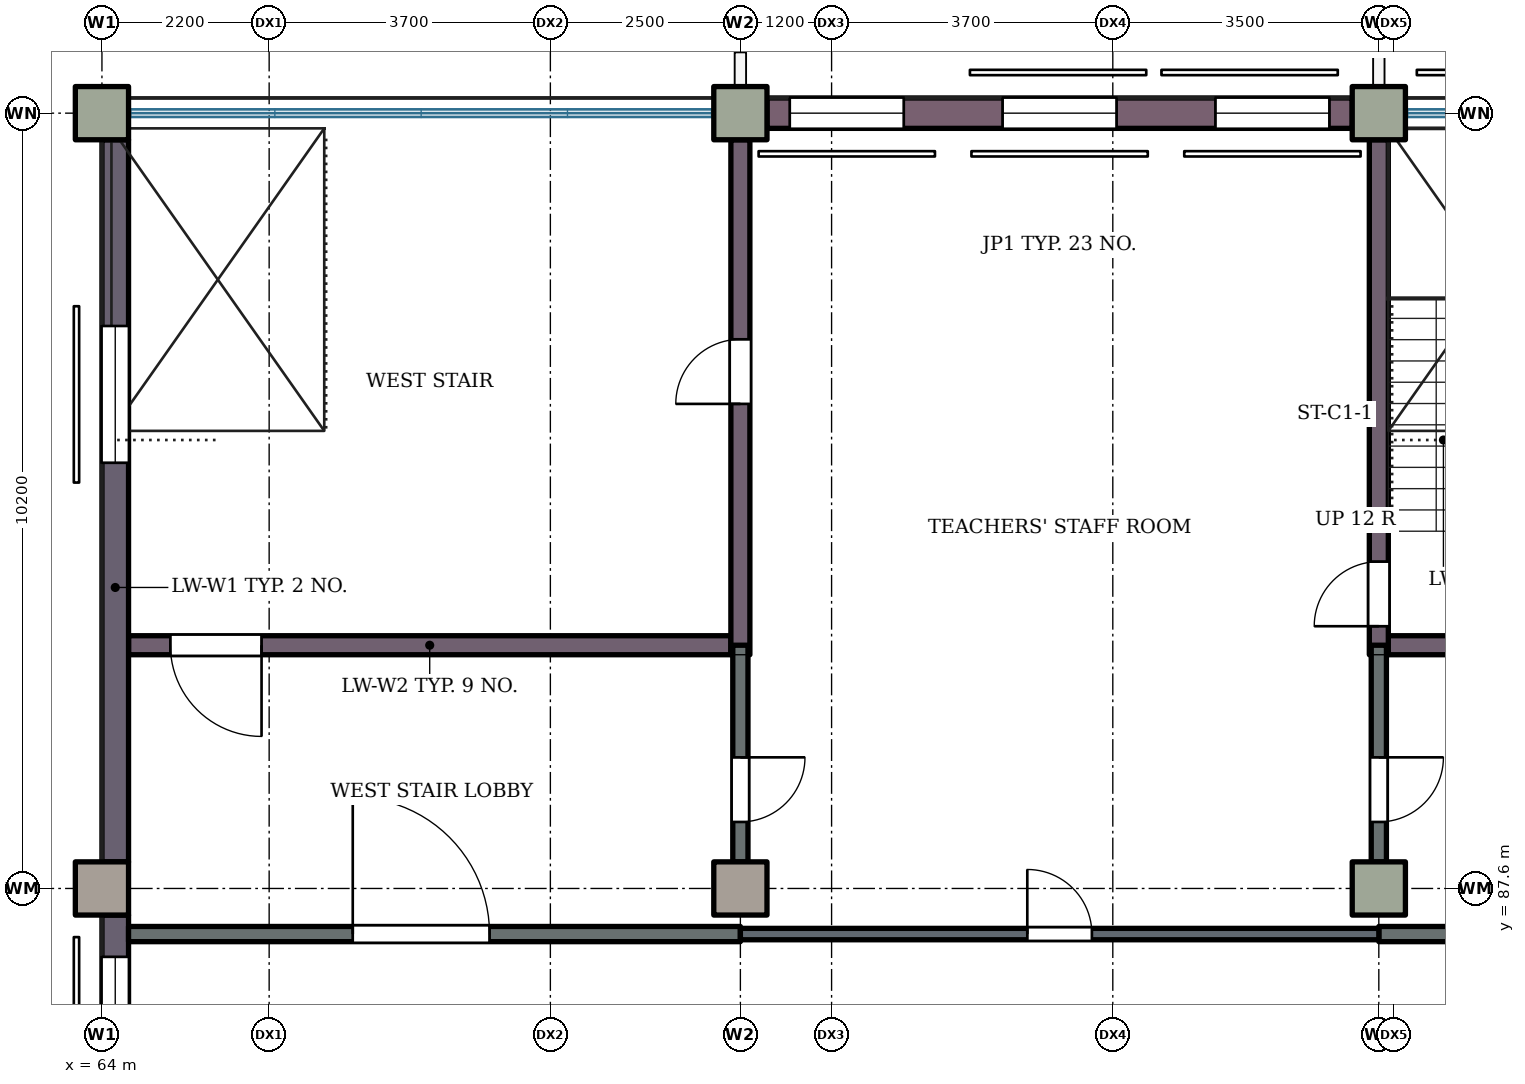
"""IFC4 building model, lengths in metres.
Left out: names, types, materials, properties, quantities, classifications, styles, units other than length and angle.
Written with IfcOpenShell. Run it as: python <this file> out.ifc"""

import sys

from ifc_helpers import new_model, si_unit, direction, frame, frame_2d, origin, origin_2d, place, context, subcontext, project, spatial, rectangle, extrude, element, fill, save


model = new_model("IFC4")
c1 = context("Model", 3, precision=1e-05, world=origin(), true_north=direction((0.0, 1.0)))
c2 = subcontext(c1, "Body", "Model", "MODEL_VIEW")
j1 = project(units=[si_unit("LENGTHUNIT", "METRE"), si_unit("PLANEANGLEUNIT", "RADIAN")], contexts=[c1])
p1 = place(None, origin())
s1 = spatial("IfcSite", under=j1, at=p1, CompositionType="ELEMENT")
p2 = place(p1, origin())
s2 = spatial("IfcBuilding", under=s1, at=p2, CompositionType="ELEMENT")
p3 = place(p2, frame((0.0, 0.0, 4.2)))
s3 = spatial("IfcBuildingStorey", under=s2, at=p3, CompositionType="ELEMENT", Elevation=4.2)
for number, where, z_axis, x_axis in (
    (1, (64.0, 87.6, 0.0), (0.0, 0.0, 1.0), (1.0, 0.0, 0.0)),
    (2, (72.4, 87.6, 0.0), (0.0, 0.0, 1.0), (1.0, 0.0, 0.0)),
    (3, (80.8, 87.6, 0.0), (0.0, 0.0, 1.0), (1.0, 0.0, 0.0)),
    (4, (64.0, 97.8, 0.0), (0.0, 0.0, 1.0), (1.0, 0.0, 0.0)),
    (5, (72.4, 97.8, 0.0), (0.0, 0.0, 1.0), (1.0, 0.0, 0.0)),
    (6, (80.8, 97.8, 0.0), (0.0, 0.0, 1.0), (1.0, 0.0, 0.0)),
):
    element("IfcColumn", number, at=place(p3, frame(where, z_axis=z_axis, x_axis=x_axis)), inside=s3, PredefinedType="COLUMN", context=c2, shape_type="SweptSolid", body=[
        extrude(rectangle(XDim=0.7, YDim=0.7, at=origin_2d()), origin(), (0.0, 0.0, 1.0), 4.2),
    ])
p4 = place(p3, frame((64.35, 90.8, 0.0), z_axis=(0.0, 0.0, 1.0), x_axis=(1.0, 0.0, 0.0)))
e7 = element("IfcWall", 7, at=p4, inside=s3, PredefinedType="SHEAR", context=c2, shape_type="SweptSolid", body=[
    extrude(rectangle(XDim=7.925, YDim=0.25, at=frame_2d((3.962, 0.0))), origin(), (0.0, 0.0, 1.0), 4.2),
])
p5 = place(p4, frame((0.55, 0.0, 0.0)))
e8 = element("IfcOpeningElement", 8, at=p5, cuts=e7, PredefinedType="OPENING", context=c2, shape_type="SweptSolid", body=[
    extrude(rectangle(XDim=1.2, YDim=2.1, at=frame_2d((0.6, 1.05))), frame((0.0, 0.135, 0.0), z_axis=(0.0, -1.0, 0.0), x_axis=(1.0, 0.0, 0.0)), (0.0, 0.0, 1.0), 0.27),
])
p6 = place(p3, frame((80.925, 90.8, 0.0), z_axis=(0.0, 0.0, 1.0), x_axis=(1.0, 0.0, 0.0)))
e9 = element("IfcWall", 9, at=p6, inside=s3, PredefinedType="SHEAR", context=c2, shape_type="SweptSolid", body=[
    extrude(rectangle(XDim=5.45, YDim=0.25, at=frame_2d((2.725, 0.0))), origin(), (0.0, 0.0, 1.0), 4.2),
])
p7 = place(p6, frame((0.775, 0.0, 0.0)))
e10 = element("IfcOpeningElement", 10, at=p7, cuts=e9, PredefinedType="OPENING", context=c2, shape_type="SweptSolid", body=[
    extrude(rectangle(XDim=1.2, YDim=2.1, at=frame_2d((0.6, 1.05))), frame((0.0, 0.135, 0.0), z_axis=(0.0, -1.0, 0.0), x_axis=(1.0, 0.0, 0.0)), (0.0, 0.0, 1.0), 0.27),
])
p8 = place(p3, frame((64.175, 78.75, 0.0), z_axis=(0.0, 0.0, 1.0), x_axis=(0.0, 1.0, 0.0)))
e11 = element("IfcWall", 11, at=p8, inside=s3, PredefinedType="SHEAR", context=c2, shape_type="SweptSolid", body=[
    extrude(rectangle(XDim=8.5, YDim=0.35, at=frame_2d((4.25, 0.0))), origin(), (0.0, 0.0, 1.0), 4.2),
])
p9 = place(p8, frame((0.55, 0.0, 0.9)))
e12 = element("IfcOpeningElement", 12, at=p9, cuts=e11, PredefinedType="OPENING", context=c2, shape_type="SweptSolid", body=[
    extrude(rectangle(XDim=1.8, YDim=2.1, at=frame_2d((0.9, 1.05))), frame((0.0, 0.185, 0.0), z_axis=(0.0, -1.0, 0.0), x_axis=(1.0, 0.0, 0.0)), (0.0, 0.0, 1.0), 0.37),
])
p10 = place(p8, frame((6.15, 0.0, 0.9)))
e13 = element("IfcOpeningElement", 13, at=p10, cuts=e11, PredefinedType="OPENING", context=c2, shape_type="SweptSolid", body=[
    extrude(rectangle(XDim=1.8, YDim=2.1, at=frame_2d((0.9, 1.05))), frame((0.0, 0.185, 0.0), z_axis=(0.0, -1.0, 0.0), x_axis=(1.0, 0.0, 0.0)), (0.0, 0.0, 1.0), 0.37),
])
p11 = place(p3, frame((64.175, 87.95, 0.0), z_axis=(0.0, 0.0, 1.0), x_axis=(0.0, 1.0, 0.0)))
e14 = element("IfcWall", 14, at=p11, inside=s3, PredefinedType="SHEAR", context=c2, shape_type="SweptSolid", body=[
    extrude(rectangle(XDim=9.5, YDim=0.35, at=frame_2d((4.75, 0.0))), origin(), (0.0, 0.0, 1.0), 4.2),
])
p12 = place(p11, frame((5.25, 0.0, 0.9)))
e15 = element("IfcOpeningElement", 15, at=p12, cuts=e14, PredefinedType="OPENING", context=c2, shape_type="SweptSolid", body=[
    extrude(rectangle(XDim=1.8, YDim=2.1, at=frame_2d((0.9, 1.05))), frame((0.0, 0.185, 0.0), z_axis=(0.0, -1.0, 0.0), x_axis=(1.0, 0.0, 0.0)), (0.0, 0.0, 1.0), 0.37),
])
p13 = place(p3, frame((72.4, 90.675, 0.0), z_axis=(0.0, 0.0, 1.0), x_axis=(0.0, 1.0, 0.0)))
e16 = element("IfcWall", 16, at=p13, inside=s3, PredefinedType="SHEAR", context=c2, shape_type="SweptSolid", body=[
    extrude(rectangle(XDim=6.775, YDim=0.25, at=frame_2d((3.387, 0.0))), origin(), (0.0, 0.0, 1.0), 4.2),
])
p14 = place(p13, frame((3.3, 0.0, 0.0)))
e17 = element("IfcOpeningElement", 17, at=p14, cuts=e16, PredefinedType="OPENING", context=c2, shape_type="SweptSolid", body=[
    extrude(rectangle(XDim=0.85, YDim=2.1, at=frame_2d((0.425, 1.05))), frame((0.0, 0.135, 0.0), z_axis=(0.0, -1.0, 0.0), x_axis=(1.0, 0.0, 0.0)), (0.0, 0.0, 1.0), 0.27),
])
p15 = place(p3, frame((80.8, 90.675, 0.0), z_axis=(0.0, 0.0, 1.0), x_axis=(0.0, 1.0, 0.0)))
e18 = element("IfcWall", 18, at=p15, inside=s3, PredefinedType="SHEAR", context=c2, shape_type="SweptSolid", body=[
    extrude(rectangle(XDim=6.775, YDim=0.25, at=frame_2d((3.387, 0.0))), origin(), (0.0, 0.0, 1.0), 4.2),
])
p16 = place(p15, frame((0.375, 0.0, 0.0)))
e19 = element("IfcOpeningElement", 19, at=p16, cuts=e18, PredefinedType="OPENING", context=c2, shape_type="SweptSolid", body=[
    extrude(rectangle(XDim=0.85, YDim=2.1, at=frame_2d((0.425, 1.05))), frame((0.0, 0.135, 0.0), z_axis=(0.0, -1.0, 0.0), x_axis=(1.0, 0.0, 0.0)), (0.0, 0.0, 1.0), 0.27),
])
p17 = place(p3, frame((72.75, 97.8, 0.0), z_axis=(0.0, 0.0, 1.0), x_axis=(1.0, 0.0, 0.0)))
e20 = element("IfcWall", 20, at=p17, inside=s3, PredefinedType="SOLIDWALL", context=c2, shape_type="SweptSolid", body=[
    extrude(rectangle(XDim=7.7, YDim=0.4, at=frame_2d((3.85, 0.0))), origin(), (0.0, 0.0, 1.0), 3.32),
])
p18 = place(p17, frame((0.3, 0.0, 1.2)))
e21 = element("IfcOpeningElement", 21, at=p18, cuts=e20, PredefinedType="OPENING", context=c2, shape_type="SweptSolid", body=[
    extrude(rectangle(XDim=1.5, YDim=1.8, at=frame_2d((0.75, 0.9))), frame((0.0, 0.21, 0.0), z_axis=(0.0, -1.0, 0.0), x_axis=(1.0, 0.0, 0.0)), (0.0, 0.0, 1.0), 0.42),
])
p19 = place(p17, frame((3.1, 0.0, 1.2)))
e22 = element("IfcOpeningElement", 22, at=p19, cuts=e20, PredefinedType="OPENING", context=c2, shape_type="SweptSolid", body=[
    extrude(rectangle(XDim=1.5, YDim=1.8, at=frame_2d((0.75, 0.9))), frame((0.0, 0.21, 0.0), z_axis=(0.0, -1.0, 0.0), x_axis=(1.0, 0.0, 0.0)), (0.0, 0.0, 1.0), 0.42),
])
p20 = place(p17, frame((5.9, 0.0, 1.2)))
e23 = element("IfcOpeningElement", 23, at=p20, cuts=e20, PredefinedType="OPENING", context=c2, shape_type="SweptSolid", body=[
    extrude(rectangle(XDim=1.5, YDim=1.8, at=frame_2d((0.75, 0.9))), frame((0.0, 0.21, 0.0), z_axis=(0.0, -1.0, 0.0), x_axis=(1.0, 0.0, 0.0)), (0.0, 0.0, 1.0), 0.42),
])
p21 = place(p3, frame((64.35, 87.0, 0.0), z_axis=(0.0, 0.0, 1.0), x_axis=(1.0, 0.0, 0.0)))
e24 = element("IfcWall", 24, at=p21, inside=s3, PredefinedType="PARTITIONING", context=c2, shape_type="SweptSolid", body=[
    extrude(rectangle(XDim=8.05, YDim=0.2, at=frame_2d((4.025, 0.0))), origin(), (0.0, 0.0, 1.0), 3.92),
])
p22 = place(p21, frame((2.95, 0.0, 0.0)))
e25 = element("IfcOpeningElement", 25, at=p22, cuts=e24, PredefinedType="OPENING", context=c2, shape_type="SweptSolid", body=[
    extrude(rectangle(XDim=1.8, YDim=2.1, at=frame_2d((0.9, 1.05))), frame((0.0, 0.11, 0.0), z_axis=(0.0, -1.0, 0.0), x_axis=(1.0, 0.0, 0.0)), (0.0, 0.0, 1.0), 0.22),
])
p23 = place(p3, frame((80.8, 87.0, 0.0), z_axis=(0.0, 0.0, 1.0), x_axis=(1.0, 0.0, 0.0)))
e26 = element("IfcWall", 26, at=p23, inside=s3, PredefinedType="PARTITIONING", context=c2, shape_type="SweptSolid", body=[
    extrude(rectangle(XDim=8.4, YDim=0.2, at=frame_2d((4.2, 0.0))), origin(), (0.0, 0.0, 1.0), 3.92),
])
p24 = place(p23, frame((3.3, 0.0, 0.0)))
e27 = element("IfcOpeningElement", 27, at=p24, cuts=e26, PredefinedType="OPENING", context=c2, shape_type="SweptSolid", body=[
    extrude(rectangle(XDim=1.8, YDim=2.1, at=frame_2d((0.9, 1.05))), frame((0.0, 0.11, 0.0), z_axis=(0.0, -1.0, 0.0), x_axis=(1.0, 0.0, 0.0)), (0.0, 0.0, 1.0), 0.22),
])
p25 = place(p3, frame((72.4, 87.0, 0.0), z_axis=(0.0, 0.0, 1.0), x_axis=(1.0, 0.0, 0.0)))
e28 = element("IfcWall", 28, at=p25, inside=s3, PredefinedType="PARTITIONING", context=c2, shape_type="SweptSolid", body=[
    extrude(rectangle(XDim=8.4, YDim=0.15, at=frame_2d((4.2, 0.0))), origin(), (0.0, 0.0, 1.0), 3.92),
])
p26 = place(p25, frame((3.775, 0.0, 0.0)))
e29 = element("IfcOpeningElement", 29, at=p26, cuts=e28, PredefinedType="OPENING", context=c2, shape_type="SweptSolid", body=[
    extrude(rectangle(XDim=0.85, YDim=2.1, at=frame_2d((0.425, 1.05))), frame((0.0, 0.085, 0.0), z_axis=(0.0, -1.0, 0.0), x_axis=(1.0, 0.0, 0.0)), (0.0, 0.0, 1.0), 0.17),
])
p27 = place(p3, frame((72.4, 87.95, 0.0), z_axis=(0.0, 0.0, 1.0), x_axis=(0.0, 1.0, 0.0)))
e30 = element("IfcWall", 30, at=p27, inside=s3, PredefinedType="PARTITIONING", context=c2, shape_type="SweptSolid", body=[
    extrude(rectangle(XDim=2.85, YDim=0.2, at=frame_2d((1.425, 0.0))), origin(), (0.0, 0.0, 1.0), 3.02),
])
p28 = place(p27, frame((0.525, 0.0, 0.0)))
e31 = element("IfcOpeningElement", 31, at=p28, cuts=e30, PredefinedType="OPENING", context=c2, shape_type="SweptSolid", body=[
    extrude(rectangle(XDim=0.85, YDim=2.1, at=frame_2d((0.425, 1.05))), frame((0.0, 0.11, 0.0), z_axis=(0.0, -1.0, 0.0), x_axis=(1.0, 0.0, 0.0)), (0.0, 0.0, 1.0), 0.22),
])
p29 = place(p3, frame((80.8, 87.95, 0.0), z_axis=(0.0, 0.0, 1.0), x_axis=(0.0, 1.0, 0.0)))
e32 = element("IfcWall", 32, at=p29, inside=s3, PredefinedType="PARTITIONING", context=c2, shape_type="SweptSolid", body=[
    extrude(rectangle(XDim=2.85, YDim=0.2, at=frame_2d((1.425, 0.0))), origin(), (0.0, 0.0, 1.0), 3.02),
])
p30 = place(p29, frame((0.525, 0.0, 0.0)))
e33 = element("IfcOpeningElement", 33, at=p30, cuts=e32, PredefinedType="OPENING", context=c2, shape_type="SweptSolid", body=[
    extrude(rectangle(XDim=0.85, YDim=2.1, at=frame_2d((0.425, 1.05))), frame((0.0, 0.11, 0.0), z_axis=(0.0, -1.0, 0.0), x_axis=(1.0, 0.0, 0.0)), (0.0, 0.0, 1.0), 0.22),
])
p31 = place(p18, origin())
e34 = element("IfcWindow", 34, at=p31, inside=s3, PartitioningType="SINGLE_PANEL", PredefinedType="WINDOW", context=c2, shape_type="SweptSolid", body=[
    extrude(rectangle(XDim=1.5, YDim=1.8, at=frame_2d((0.75, 0.9))), frame((0.0, 0.03, 0.0), z_axis=(0.0, -1.0, 0.0), x_axis=(1.0, 0.0, 0.0)), (0.0, 0.0, 1.0), 0.06),
])
fill(e21, e34)
p32 = place(p19, origin())
e35 = element("IfcWindow", 35, at=p32, inside=s3, PartitioningType="SINGLE_PANEL", PredefinedType="WINDOW", context=c2, shape_type="SweptSolid", body=[
    extrude(rectangle(XDim=1.5, YDim=1.8, at=frame_2d((0.75, 0.9))), frame((0.0, 0.03, 0.0), z_axis=(0.0, -1.0, 0.0), x_axis=(1.0, 0.0, 0.0)), (0.0, 0.0, 1.0), 0.06),
])
fill(e22, e35)
p33 = place(p20, origin())
e36 = element("IfcWindow", 36, at=p33, inside=s3, PartitioningType="SINGLE_PANEL", PredefinedType="WINDOW", context=c2, shape_type="SweptSolid", body=[
    extrude(rectangle(XDim=1.5, YDim=1.8, at=frame_2d((0.75, 0.9))), frame((0.0, 0.03, 0.0), z_axis=(0.0, -1.0, 0.0), x_axis=(1.0, 0.0, 0.0)), (0.0, 0.0, 1.0), 0.06),
])
fill(e23, e36)
p34 = place(p10, origin())
e37 = element("IfcWindow", 37, at=p34, inside=s3, PartitioningType="SINGLE_PANEL", PredefinedType="WINDOW", context=c2, shape_type="SweptSolid", body=[
    extrude(rectangle(XDim=1.8, YDim=2.1, at=frame_2d((0.9, 1.05))), frame((0.0, 0.03, 0.0), z_axis=(0.0, -1.0, 0.0), x_axis=(1.0, 0.0, 0.0)), (0.0, 0.0, 1.0), 0.06),
])
fill(e13, e37)
p35 = place(p12, origin())
e38 = element("IfcWindow", 38, at=p35, inside=s3, PartitioningType="SINGLE_PANEL", PredefinedType="WINDOW", context=c2, shape_type="SweptSolid", body=[
    extrude(rectangle(XDim=1.8, YDim=2.1, at=frame_2d((0.9, 1.05))), frame((0.0, 0.03, 0.0), z_axis=(0.0, -1.0, 0.0), x_axis=(1.0, 0.0, 0.0)), (0.0, 0.0, 1.0), 0.06),
])
fill(e15, e38)
p36 = place(p26, origin())
e39 = element("IfcDoor", 39, at=p36, inside=s3, OperationType="SINGLE_SWING_LEFT", PredefinedType="DOOR", context=c2, shape_type="SweptSolid", body=[
    extrude(rectangle(XDim=0.85, YDim=2.1, at=frame_2d((0.425, 1.05))), frame((0.0, 0.025, 0.0), z_axis=(0.0, -1.0, 0.0), x_axis=(1.0, 0.0, 0.0)), (0.0, 0.0, 1.0), 0.05),
])
fill(e29, e39)
p37 = place(p28, origin())
e40 = element("IfcDoor", 40, at=p37, inside=s3, OperationType="SINGLE_SWING_RIGHT", PredefinedType="DOOR", context=c2, shape_type="SweptSolid", body=[
    extrude(rectangle(XDim=0.85, YDim=2.1, at=frame_2d((0.425, 1.05))), frame((0.0, 0.025, 0.0), z_axis=(0.0, -1.0, 0.0), x_axis=(1.0, 0.0, 0.0)), (0.0, 0.0, 1.0), 0.05),
])
fill(e31, e40)
p38 = place(p14, origin())
e41 = element("IfcDoor", 41, at=p38, inside=s3, OperationType="SINGLE_SWING_LEFT", PredefinedType="DOOR", context=c2, shape_type="SweptSolid", body=[
    extrude(rectangle(XDim=0.85, YDim=2.1, at=frame_2d((0.425, 1.05))), frame((0.0, 0.025, 0.0), z_axis=(0.0, -1.0, 0.0), x_axis=(1.0, 0.0, 0.0)), (0.0, 0.0, 1.0), 0.05),
])
fill(e17, e41)
p39 = place(p30, origin())
e42 = element("IfcDoor", 42, at=p39, inside=s3, OperationType="SINGLE_SWING_RIGHT", PredefinedType="DOOR", context=c2, shape_type="SweptSolid", body=[
    extrude(rectangle(XDim=0.85, YDim=2.1, at=frame_2d((0.425, 1.05))), frame((0.0, 0.025, 0.0), z_axis=(0.0, -1.0, 0.0), x_axis=(1.0, 0.0, 0.0)), (0.0, 0.0, 1.0), 0.05),
])
fill(e33, e42)
p40 = place(p16, origin())
e43 = element("IfcDoor", 43, at=p40, inside=s3, OperationType="SINGLE_SWING_LEFT", PredefinedType="DOOR", context=c2, shape_type="SweptSolid", body=[
    extrude(rectangle(XDim=0.85, YDim=2.1, at=frame_2d((0.425, 1.05))), frame((0.0, 0.025, 0.0), z_axis=(0.0, -1.0, 0.0), x_axis=(1.0, 0.0, 0.0)), (0.0, 0.0, 1.0), 0.05),
])
fill(e19, e43)
p41 = place(p22, origin())
e44 = element("IfcDoor", 44, at=p41, inside=s3, OperationType="DOUBLE_DOOR_SINGLE_SWING", PredefinedType="DOOR", context=c2, shape_type="SweptSolid", body=[
    extrude(rectangle(XDim=1.8, YDim=2.1, at=frame_2d((0.9, 1.05))), frame((0.0, 0.025, 0.0), z_axis=(0.0, -1.0, 0.0), x_axis=(1.0, 0.0, 0.0)), (0.0, 0.0, 1.0), 0.05),
])
fill(e25, e44)
p42 = place(p5, origin())
e45 = element("IfcDoor", 45, at=p42, inside=s3, OperationType="SINGLE_SWING_RIGHT", PredefinedType="DOOR", context=c2, shape_type="SweptSolid", body=[
    extrude(rectangle(XDim=1.2, YDim=2.1, at=frame_2d((0.6, 1.05))), frame((0.0, 0.025, 0.0), z_axis=(0.0, -1.0, 0.0), x_axis=(1.0, 0.0, 0.0)), (0.0, 0.0, 1.0), 0.05),
])
fill(e8, e45)
save(model, sys.argv[1])
